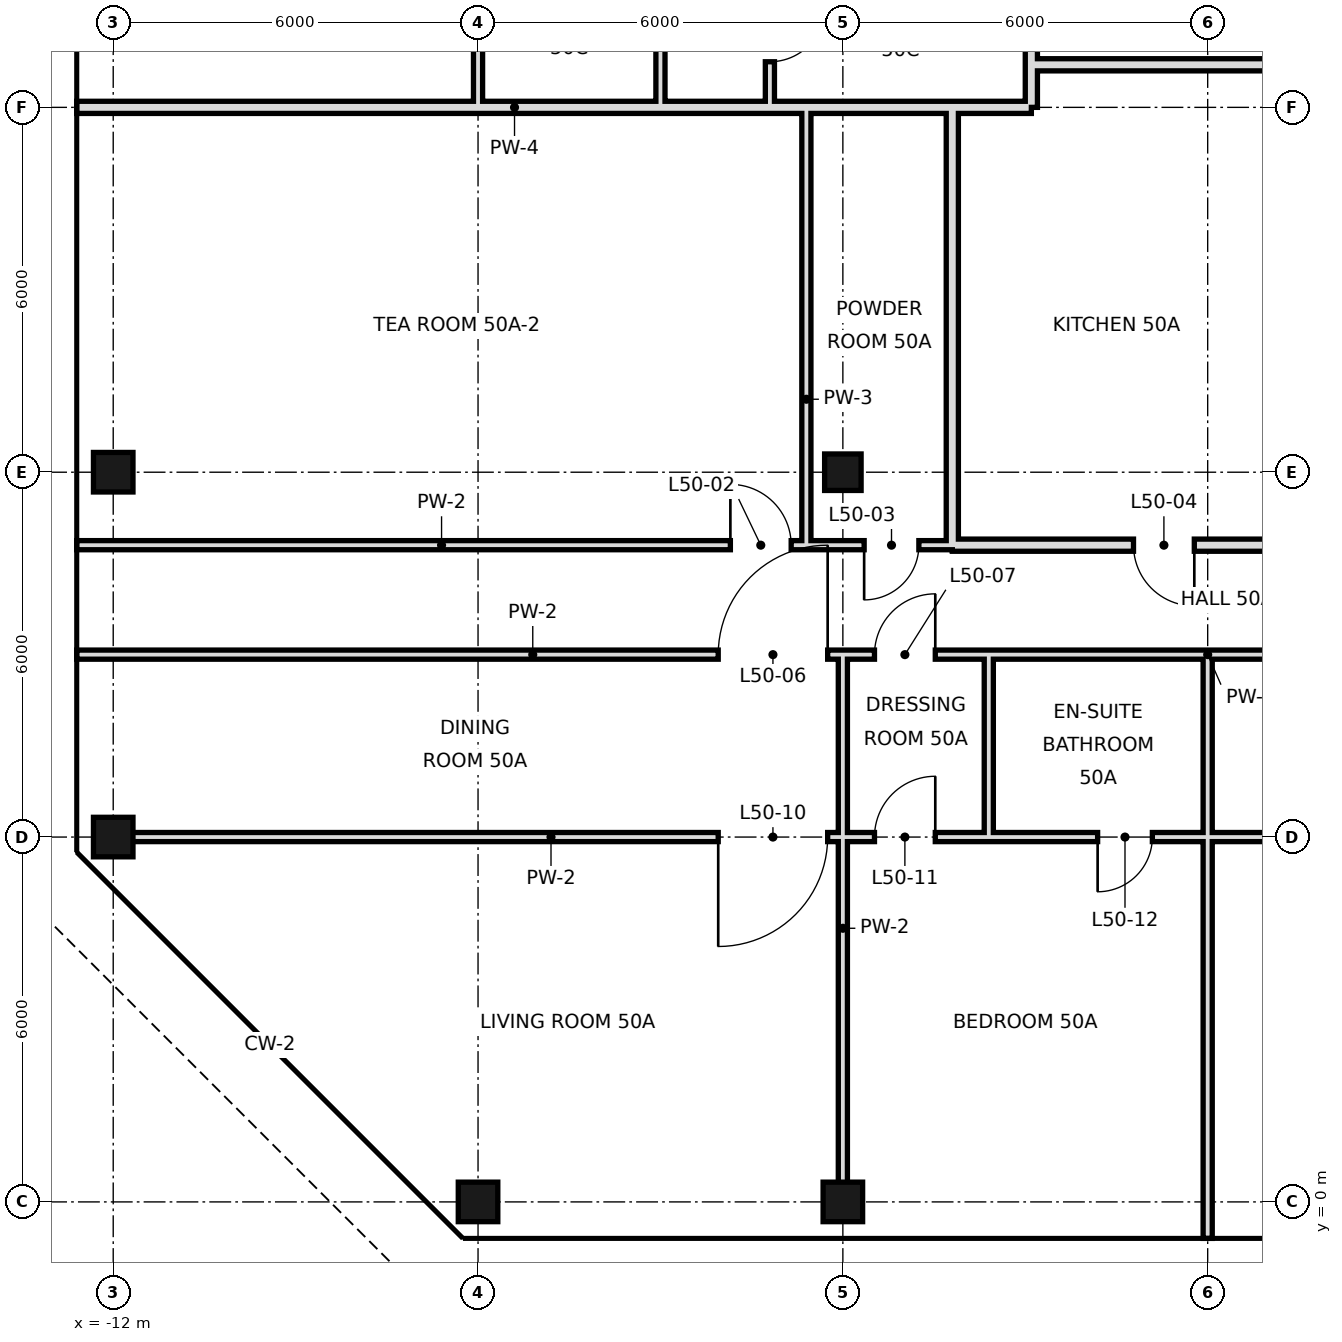
"""IFC4 building model, lengths in metres.
Left out: names, types, materials, properties, quantities, classifications, styles, units other than length and angle.
Written with IfcOpenShell. Run it as: python <this file> out.ifc"""

import sys

from ifc_helpers import new_model, si_unit, direction, frame, frame_2d, origin, origin_2d, place, context, subcontext, project, spatial, rectangle, hollow_rectangle, extrude, element, fill, save


model = new_model("IFC4")
c1 = context("Model", 3, precision=1e-05, world=origin(), true_north=direction((0.0, 1.0)))
c2 = subcontext(c1, "Body", "Model", "MODEL_VIEW")
j1 = project(units=[si_unit("LENGTHUNIT", "METRE"), si_unit("PLANEANGLEUNIT", "RADIAN")], contexts=[c1])
p1 = place(None, origin())
s1 = spatial("IfcSite", under=j1, at=p1, CompositionType="ELEMENT")
p2 = place(p1, origin())
s2 = spatial("IfcBuilding", under=s1, at=p2, CompositionType="ELEMENT")
p3 = place(p2, frame((0.0, 0.0, 215.4)))
s3 = spatial("IfcBuildingStorey", under=s2, at=p3, CompositionType="ELEMENT", Elevation=215.4)
for number, where, z_axis, x_axis in (
    (1, (-12.0, 6.0, 0.0), (0.0, 0.0, 1.0), (1.0, 0.0, 0.0)),
    (2, (-12.0, 12.0, 0.0), (0.0, 0.0, 1.0), (1.0, 0.0, 0.0)),
    (3, (-6.0, 0.0, 0.0), (0.0, 0.0, 1.0), (1.0, 0.0, 0.0)),
    (4, (0.0, 0.0, 0.0), (0.0, 0.0, 1.0), (1.0, 0.0, 0.0)),
):
    element("IfcColumn", number, at=place(p3, frame(where, z_axis=z_axis, x_axis=x_axis)), inside=s3, PredefinedType="COLUMN", context=c2, shape_type="SweptSolid", body=[
        extrude(hollow_rectangle(XDim=0.65, YDim=0.65, WallThickness=0.032, at=origin_2d()), origin(), (0.0, 0.0, 1.0), 3.6),
    ])
p4 = place(p3, frame((0.0, 12.0, 0.0), z_axis=(0.0, 0.0, 1.0), x_axis=(1.0, 0.0, 0.0)))
e5 = element("IfcColumn", 5, at=p4, inside=s3, PredefinedType="COLUMN", context=c2, shape_type="SweptSolid", body=[
    extrude(hollow_rectangle(XDim=0.6, YDim=0.6, WallThickness=0.028, at=origin_2d()), origin(), (0.0, 0.0, 1.0), 3.6),
])
p5 = place(p3, frame((-0.6, 10.8, 0.0), z_axis=(0.0, 0.0, 1.0), x_axis=(0.0, 1.0, 0.0)))
e6 = element("IfcWall", 6, at=p5, inside=s3, PredefinedType="PARTITIONING", context=c2, shape_type="SweptSolid", body=[
    extrude(rectangle(XDim=7.2, YDim=0.15, at=frame_2d((3.6, 0.0))), origin(), (0.0, 0.0, 1.0), 3.42),
])
p6 = place(p3, frame((-1.2, 18.0, 0.0), z_axis=(0.0, 0.0, 1.0), x_axis=(0.0, 1.0, 0.0)))
e7 = element("IfcWall", 7, at=p6, inside=s3, PredefinedType="PARTITIONING", context=c2, shape_type="SweptSolid", body=[
    extrude(rectangle(XDim=2.4, YDim=0.15, at=frame_2d((1.2, 0.0))), origin(), (0.0, 0.0, 1.0), 3.42),
])
p7 = place(p6, frame((0.75, 0.0, 0.0)))
e8 = element("IfcOpeningElement", 8, at=p7, cuts=e7, PredefinedType="OPENING", context=c2, shape_type="SweptSolid", body=[
    extrude(rectangle(XDim=0.9, YDim=2.4, at=frame_2d((0.45, 1.2))), frame((0.0, 0.085, 0.0), z_axis=(0.0, -1.0, 0.0), x_axis=(1.0, 0.0, 0.0)), (0.0, 0.0, 1.0), 0.17),
])
p8 = place(p3, frame((-3.0, 18.0, 0.0), z_axis=(0.0, 0.0, 1.0), x_axis=(0.0, 1.0, 0.0)))
e9 = element("IfcWall", 9, at=p8, inside=s3, PredefinedType="PARTITIONING", context=c2, shape_type="SweptSolid", body=[
    extrude(rectangle(XDim=3.0, YDim=0.15, at=frame_2d((1.5, 0.0))), origin(), (0.0, 0.0, 1.0), 3.42),
])
p9 = place(p3, frame((-6.0, 18.0, 0.0), z_axis=(0.0, 0.0, 1.0), x_axis=(0.0, 1.0, 0.0)))
e10 = element("IfcWall", 10, at=p9, inside=s3, PredefinedType="PARTITIONING", context=c2, shape_type="SweptSolid", body=[
    extrude(rectangle(XDim=3.0, YDim=0.15, at=frame_2d((1.5, 0.0))), origin(), (0.0, 0.0, 1.0), 3.42),
])
p10 = place(p9, frame((1.05, 0.0, 0.0)))
e11 = element("IfcOpeningElement", 11, at=p10, cuts=e10, PredefinedType="OPENING", context=c2, shape_type="SweptSolid", body=[
    extrude(rectangle(XDim=0.9, YDim=2.4, at=frame_2d((0.45, 1.2))), frame((0.0, 0.085, 0.0), z_axis=(0.0, -1.0, 0.0), x_axis=(1.0, 0.0, 0.0)), (0.0, 0.0, 1.0), 0.17),
])
p11 = place(p3, frame((0.0, 0.0, 0.0), z_axis=(0.0, 0.0, 1.0), x_axis=(0.0, 1.0, 0.0)))
e12 = element("IfcWall", 12, at=p11, inside=s3, PredefinedType="PARTITIONING", context=c2, shape_type="SweptSolid", body=[
    extrude(rectangle(XDim=9.0, YDim=0.15, at=frame_2d((4.5, 0.0))), origin(), (0.0, 0.0, 1.0), 2.72),
])
p12 = place(p3, frame((1.8, 10.8, 0.0), z_axis=(0.0, 0.0, 1.0), x_axis=(0.0, 1.0, 0.0)))
e13 = element("IfcWall", 13, at=p12, inside=s3, PredefinedType="SOLIDWALL", context=c2, shape_type="SweptSolid", body=[
    extrude(rectangle(XDim=7.2, YDim=0.2, at=frame_2d((3.6, 0.0))), origin(), (0.0, 0.0, 1.0), 3.42),
])
p13 = place(p3, frame((2.4, 6.0, 0.0), z_axis=(0.0, 0.0, 1.0), x_axis=(0.0, 1.0, 0.0)))
e14 = element("IfcWall", 14, at=p13, inside=s3, PredefinedType="PARTITIONING", context=c2, shape_type="SweptSolid", body=[
    extrude(rectangle(XDim=3.0, YDim=0.15, at=frame_2d((1.5, 0.0))), origin(), (0.0, 0.0, 1.0), 3.42),
])
p14 = place(p3, frame((3.1, 18.7, 0.0), z_axis=(0.0, 0.0, 1.0), x_axis=(0.0, 1.0, 0.0)))
e15 = element("IfcWall", 15, at=p14, inside=s3, PredefinedType="SOLIDWALL", context=c2, shape_type="SweptSolid", body=[
    extrude(rectangle(XDim=15.5, YDim=0.2, at=frame_2d((7.75, 0.0))), origin(), (0.0, 0.0, 1.0), 2.97),
])
p15 = place(p14, frame((4.96, 0.0, 0.0)))
e16 = element("IfcOpeningElement", 16, at=p15, cuts=e15, PredefinedType="OPENING", context=c2, shape_type="SweptSolid", body=[
    extrude(rectangle(XDim=1.2, YDim=2.4, at=frame_2d((0.6, 1.2))), frame((0.0, 0.11, 0.0), z_axis=(0.0, -1.0, 0.0), x_axis=(1.0, 0.0, 0.0)), (0.0, 0.0, 1.0), 0.22),
])
p16 = place(p3, frame((3.1, 18.0, 0.0), z_axis=(0.0, 0.0, 1.0), x_axis=(0.0, 1.0, 0.0)))
e17 = element("IfcWall", 17, at=p16, inside=s3, PredefinedType="SOLIDWALL", context=c2, shape_type="SweptSolid", body=[
    extrude(rectangle(XDim=0.7, YDim=0.2, at=frame_2d((0.35, 0.0))), origin(), (0.0, 0.0, 1.0), 2.97),
])
p17 = place(p3, frame((6.0, -0.6, 0.0), z_axis=(0.0, 0.0, 1.0), x_axis=(0.0, 1.0, 0.0)))
e18 = element("IfcWall", 18, at=p17, inside=s3, PredefinedType="PARTITIONING", context=c2, shape_type="SweptSolid", body=[
    extrude(rectangle(XDim=6.6, YDim=0.15, at=frame_2d((3.3, 0.0))), origin(), (0.0, 0.0, 1.0), 2.72),
])
p18 = place(p3, frame((6.0, 6.0, 0.0), z_axis=(0.0, 0.0, 1.0), x_axis=(0.0, 1.0, 0.0)))
e19 = element("IfcWall", 19, at=p18, inside=s3, PredefinedType="PARTITIONING", context=c2, shape_type="SweptSolid", body=[
    extrude(rectangle(XDim=3.0, YDim=0.15, at=frame_2d((1.5, 0.0))), origin(), (0.0, 0.0, 1.0), 2.72),
])
p19 = place(p3, frame((1.8, 10.8, 0.0), z_axis=(0.0, 0.0, 1.0), x_axis=(1.0, 0.0, 0.0)))
e20 = element("IfcWall", 20, at=p19, inside=s3, PredefinedType="SOLIDWALL", context=c2, shape_type="SweptSolid", body=[
    extrude(rectangle(XDim=5.4, YDim=0.2, at=frame_2d((2.7, 0.0))), origin(), (0.0, 0.0, 1.0), 2.72),
])
p20 = place(p19, frame((2.98, 0.0, 0.0)))
e21 = element("IfcOpeningElement", 21, at=p20, cuts=e20, PredefinedType="OPENING", context=c2, shape_type="SweptSolid", body=[
    extrude(rectangle(XDim=1.0, YDim=2.4, at=frame_2d((0.5, 1.2))), frame((0.0, 0.11, 0.0), z_axis=(0.0, -1.0, 0.0), x_axis=(1.0, 0.0, 0.0)), (0.0, 0.0, 1.0), 0.22),
])
p21 = place(p3, frame((-12.6, 10.8, 0.0), z_axis=(0.0, 0.0, 1.0), x_axis=(1.0, 0.0, 0.0)))
e22 = element("IfcWall", 22, at=p21, inside=s3, PredefinedType="PARTITIONING", context=c2, shape_type="SweptSolid", body=[
    extrude(rectangle(XDim=12.0, YDim=0.15, at=frame_2d((6.0, 0.0))), origin(), (0.0, 0.0, 1.0), 3.42),
])
p22 = place(p21, frame((10.75, 0.0, 0.0)))
e23 = element("IfcOpeningElement", 23, at=p22, cuts=e22, PredefinedType="OPENING", context=c2, shape_type="SweptSolid", body=[
    extrude(rectangle(XDim=1.0, YDim=2.4, at=frame_2d((0.5, 1.2))), frame((0.0, 0.085, 0.0), z_axis=(0.0, -1.0, 0.0), x_axis=(1.0, 0.0, 0.0)), (0.0, 0.0, 1.0), 0.17),
])
p23 = place(p3, frame((-0.6, 10.8, 0.0), z_axis=(0.0, 0.0, 1.0), x_axis=(1.0, 0.0, 0.0)))
e24 = element("IfcWall", 24, at=p23, inside=s3, PredefinedType="PARTITIONING", context=c2, shape_type="SweptSolid", body=[
    extrude(rectangle(XDim=2.4, YDim=0.15, at=frame_2d((1.2, 0.0))), origin(), (0.0, 0.0, 1.0), 3.42),
])
p24 = place(p23, frame((0.95, 0.0, 0.0)))
e25 = element("IfcOpeningElement", 25, at=p24, cuts=e24, PredefinedType="OPENING", context=c2, shape_type="SweptSolid", body=[
    extrude(rectangle(XDim=0.9, YDim=2.4, at=frame_2d((0.45, 1.2))), frame((0.0, 0.085, 0.0), z_axis=(0.0, -1.0, 0.0), x_axis=(1.0, 0.0, 0.0)), (0.0, 0.0, 1.0), 0.17),
])
p25 = place(p3, frame((1.8, 18.0, 0.0), z_axis=(0.0, 0.0, 1.0), x_axis=(1.0, 0.0, 0.0)))
e26 = element("IfcWall", 26, at=p25, inside=s3, PredefinedType="SOLIDWALL", context=c2, shape_type="SweptSolid", body=[
    extrude(rectangle(XDim=1.3, YDim=0.2, at=frame_2d((0.65, 0.0))), origin(), (0.0, 0.0, 1.0), 2.97),
])
p26 = place(p3, frame((-12.6, 18.0, 0.0), z_axis=(0.0, 0.0, 1.0), x_axis=(1.0, 0.0, 0.0)))
e27 = element("IfcWall", 27, at=p26, inside=s3, PredefinedType="SOLIDWALL", context=c2, shape_type="SweptSolid", body=[
    extrude(rectangle(XDim=14.4, YDim=0.2, at=frame_2d((7.2, 0.0))), origin(), (0.0, 0.0, 1.0), 2.72),
])
p27 = place(p3, frame((3.1, 18.7, 0.0), z_axis=(0.0, 0.0, 1.0), x_axis=(1.0, 0.0, 0.0)))
e28 = element("IfcWall", 28, at=p27, inside=s3, PredefinedType="SOLIDWALL", context=c2, shape_type="SweptSolid", body=[
    extrude(rectangle(XDim=4.1, YDim=0.2, at=frame_2d((2.05, 0.0))), origin(), (0.0, 0.0, 1.0), 2.72),
])
p28 = place(p3, frame((-12.0, 6.0, 0.0), z_axis=(0.0, 0.0, 1.0), x_axis=(1.0, 0.0, 0.0)))
e29 = element("IfcWall", 29, at=p28, inside=s3, PredefinedType="PARTITIONING", context=c2, shape_type="SweptSolid", body=[
    extrude(rectangle(XDim=14.4, YDim=0.15, at=frame_2d((7.2, 0.0))), origin(), (0.0, 0.0, 1.0), 2.72),
])
p29 = place(p28, frame((9.95, 0.0, 0.0)))
e30 = element("IfcOpeningElement", 30, at=p29, cuts=e29, PredefinedType="OPENING", context=c2, shape_type="SweptSolid", body=[
    extrude(rectangle(XDim=1.8, YDim=2.4, at=frame_2d((0.9, 1.2))), frame((0.0, 0.085, 0.0), z_axis=(0.0, -1.0, 0.0), x_axis=(1.0, 0.0, 0.0)), (0.0, 0.0, 1.0), 0.17),
])
p30 = place(p28, frame((12.52, 0.0, 0.0)))
e31 = element("IfcOpeningElement", 31, at=p30, cuts=e29, PredefinedType="OPENING", context=c2, shape_type="SweptSolid", body=[
    extrude(rectangle(XDim=1.0, YDim=2.4, at=frame_2d((0.5, 1.2))), frame((0.0, 0.085, 0.0), z_axis=(0.0, -1.0, 0.0), x_axis=(1.0, 0.0, 0.0)), (0.0, 0.0, 1.0), 0.17),
])
p31 = place(p3, frame((6.0, 6.0, 0.0), z_axis=(0.0, 0.0, 1.0), x_axis=(1.0, 0.0, 0.0)))
e32 = element("IfcWall", 32, at=p31, inside=s3, PredefinedType="PARTITIONING", context=c2, shape_type="SweptSolid", body=[
    extrude(rectangle(XDim=12.0, YDim=0.15, at=frame_2d((6.0, 0.0))), origin(), (0.0, 0.0, 1.0), 2.97),
])
p32 = place(p31, frame((3.4, 0.0, 0.0)))
e33 = element("IfcOpeningElement", 33, at=p32, cuts=e32, PredefinedType="OPENING", context=c2, shape_type="SweptSolid", body=[
    extrude(rectangle(XDim=1.0, YDim=2.4, at=frame_2d((0.5, 1.2))), frame((0.0, 0.085, 0.0), z_axis=(0.0, -1.0, 0.0), x_axis=(1.0, 0.0, 0.0)), (0.0, 0.0, 1.0), 0.17),
])
p33 = place(p3, frame((2.4, 6.0, 0.0), z_axis=(0.0, 0.0, 1.0), x_axis=(1.0, 0.0, 0.0)))
e34 = element("IfcWall", 34, at=p33, inside=s3, PredefinedType="PARTITIONING", context=c2, shape_type="SweptSolid", body=[
    extrude(rectangle(XDim=3.6, YDim=0.15, at=frame_2d((1.8, 0.0))), origin(), (0.0, 0.0, 1.0), 2.97),
])
p34 = place(p33, frame((1.79, 0.0, 0.0)))
e35 = element("IfcOpeningElement", 35, at=p34, cuts=e34, PredefinedType="OPENING", context=c2, shape_type="SweptSolid", body=[
    extrude(rectangle(XDim=0.9, YDim=2.4, at=frame_2d((0.45, 1.2))), frame((0.0, 0.085, 0.0), z_axis=(0.0, -1.0, 0.0), x_axis=(1.0, 0.0, 0.0)), (0.0, 0.0, 1.0), 0.17),
])
p35 = place(p3, frame((-12.6, 9.0, 0.0), z_axis=(0.0, 0.0, 1.0), x_axis=(1.0, 0.0, 0.0)))
e36 = element("IfcWall", 36, at=p35, inside=s3, PredefinedType="PARTITIONING", context=c2, shape_type="SweptSolid", body=[
    extrude(rectangle(XDim=15.0, YDim=0.15, at=frame_2d((7.5, 0.0))), origin(), (0.0, 0.0, 1.0), 3.42),
])
p36 = place(p35, frame((10.55, 0.0, 0.0)))
e37 = element("IfcOpeningElement", 37, at=p36, cuts=e36, PredefinedType="OPENING", context=c2, shape_type="SweptSolid", body=[
    extrude(rectangle(XDim=1.8, YDim=2.4, at=frame_2d((0.9, 1.2))), frame((0.0, 0.085, 0.0), z_axis=(0.0, -1.0, 0.0), x_axis=(1.0, 0.0, 0.0)), (0.0, 0.0, 1.0), 0.17),
])
p37 = place(p35, frame((13.12, 0.0, 0.0)))
e38 = element("IfcOpeningElement", 38, at=p37, cuts=e36, PredefinedType="OPENING", context=c2, shape_type="SweptSolid", body=[
    extrude(rectangle(XDim=1.0, YDim=2.4, at=frame_2d((0.5, 1.2))), frame((0.0, 0.085, 0.0), z_axis=(0.0, -1.0, 0.0), x_axis=(1.0, 0.0, 0.0)), (0.0, 0.0, 1.0), 0.17),
])
p38 = place(p3, frame((6.0, 9.0, 0.0), z_axis=(0.0, 0.0, 1.0), x_axis=(1.0, 0.0, 0.0)))
e39 = element("IfcWall", 39, at=p38, inside=s3, PredefinedType="PARTITIONING", context=c2, shape_type="SweptSolid", body=[
    extrude(rectangle(XDim=18.0, YDim=0.15, at=frame_2d((9.0, 0.0))), origin(), (0.0, 0.0, 1.0), 3.42),
])
p39 = place(p38, frame((5.5, 0.0, 0.0)))
e40 = element("IfcOpeningElement", 40, at=p39, cuts=e39, PredefinedType="OPENING", context=c2, shape_type="SweptSolid", body=[
    extrude(rectangle(XDim=1.0, YDim=2.4, at=frame_2d((0.5, 1.2))), frame((0.0, 0.085, 0.0), z_axis=(0.0, -1.0, 0.0), x_axis=(1.0, 0.0, 0.0)), (0.0, 0.0, 1.0), 0.17),
])
p40 = place(p38, frame((13.6, 0.0, 0.0)))
e41 = element("IfcOpeningElement", 41, at=p40, cuts=e39, PredefinedType="OPENING", context=c2, shape_type="SweptSolid", body=[
    extrude(rectangle(XDim=1.0, YDim=2.4, at=frame_2d((0.5, 1.2))), frame((0.0, 0.085, 0.0), z_axis=(0.0, -1.0, 0.0), x_axis=(1.0, 0.0, 0.0)), (0.0, 0.0, 1.0), 0.17),
])
p41 = place(p3, frame((2.4, 9.0, 0.0), z_axis=(0.0, 0.0, 1.0), x_axis=(1.0, 0.0, 0.0)))
e42 = element("IfcWall", 42, at=p41, inside=s3, PredefinedType="PARTITIONING", context=c2, shape_type="SweptSolid", body=[
    extrude(rectangle(XDim=3.6, YDim=0.15, at=frame_2d((1.8, 0.0))), origin(), (0.0, 0.0, 1.0), 3.42),
])
p42 = place(p22, origin())
e43 = element("IfcDoor", 43, at=p42, inside=s3, OperationType="SINGLE_SWING_LEFT", PredefinedType="DOOR", context=c2, shape_type="SweptSolid", body=[
    extrude(rectangle(XDim=1.0, YDim=2.4, at=frame_2d((0.5, 1.2))), frame((0.0, 0.025, 0.0), z_axis=(0.0, -1.0, 0.0), x_axis=(1.0, 0.0, 0.0)), (0.0, 0.0, 1.0), 0.05),
])
fill(e23, e43)
p43 = place(p24, frame((0.9, 0.0, 0.0), z_axis=(0.0, 0.0, 1.0), x_axis=(-1.0, 0.0, 0.0)))
e44 = element("IfcDoor", 44, at=p43, inside=s3, OperationType="SINGLE_SWING_RIGHT", PredefinedType="DOOR", context=c2, shape_type="SweptSolid", body=[
    extrude(rectangle(XDim=0.9, YDim=2.4, at=frame_2d((0.45, 1.2))), frame((0.0, 0.025, 0.0), z_axis=(0.0, -1.0, 0.0), x_axis=(1.0, 0.0, 0.0)), (0.0, 0.0, 1.0), 0.05),
])
fill(e25, e44)
p44 = place(p20, origin())
e45 = element("IfcDoor", 45, at=p44, inside=s3, OperationType="SINGLE_SWING_RIGHT", PredefinedType="DOOR", context=c2, shape_type="SweptSolid", body=[
    extrude(rectangle(XDim=1.0, YDim=2.4, at=frame_2d((0.5, 1.2))), frame((0.0, 0.025, 0.0), z_axis=(0.0, -1.0, 0.0), x_axis=(1.0, 0.0, 0.0)), (0.0, 0.0, 1.0), 0.05),
])
fill(e21, e45)
p45 = place(p36, frame((1.8, 0.0, 0.0), z_axis=(0.0, 0.0, 1.0), x_axis=(-1.0, 0.0, 0.0)))
e46 = element("IfcDoor", 46, at=p45, inside=s3, OperationType="SINGLE_SWING_LEFT", PredefinedType="DOOR", context=c2, shape_type="SweptSolid", body=[
    extrude(rectangle(XDim=1.8, YDim=2.4, at=frame_2d((0.9, 1.2))), frame((0.0, 0.025, 0.0), z_axis=(0.0, -1.0, 0.0), x_axis=(1.0, 0.0, 0.0)), (0.0, 0.0, 1.0), 0.05),
])
fill(e37, e46)
p46 = place(p37, frame((1.0, 0.0, 0.0), z_axis=(0.0, 0.0, 1.0), x_axis=(-1.0, 0.0, 0.0)))
e47 = element("IfcDoor", 47, at=p46, inside=s3, OperationType="SINGLE_SWING_LEFT", PredefinedType="DOOR", context=c2, shape_type="SweptSolid", body=[
    extrude(rectangle(XDim=1.0, YDim=2.4, at=frame_2d((0.5, 1.2))), frame((0.0, 0.025, 0.0), z_axis=(0.0, -1.0, 0.0), x_axis=(1.0, 0.0, 0.0)), (0.0, 0.0, 1.0), 0.05),
])
fill(e38, e47)
p47 = place(p29, frame((1.8, 0.0, 0.0), z_axis=(0.0, 0.0, 1.0), x_axis=(-1.0, 0.0, 0.0)))
e48 = element("IfcDoor", 48, at=p47, inside=s3, OperationType="SINGLE_SWING_RIGHT", PredefinedType="DOOR", context=c2, shape_type="SweptSolid", body=[
    extrude(rectangle(XDim=1.8, YDim=2.4, at=frame_2d((0.9, 1.2))), frame((0.0, 0.025, 0.0), z_axis=(0.0, -1.0, 0.0), x_axis=(1.0, 0.0, 0.0)), (0.0, 0.0, 1.0), 0.05),
])
fill(e30, e48)
p48 = place(p30, frame((1.0, 0.0, 0.0), z_axis=(0.0, 0.0, 1.0), x_axis=(-1.0, 0.0, 0.0)))
e49 = element("IfcDoor", 49, at=p48, inside=s3, OperationType="SINGLE_SWING_LEFT", PredefinedType="DOOR", context=c2, shape_type="SweptSolid", body=[
    extrude(rectangle(XDim=1.0, YDim=2.4, at=frame_2d((0.5, 1.2))), frame((0.0, 0.025, 0.0), z_axis=(0.0, -1.0, 0.0), x_axis=(1.0, 0.0, 0.0)), (0.0, 0.0, 1.0), 0.05),
])
fill(e31, e49)
p49 = place(p34, frame((0.9, 0.0, 0.0), z_axis=(0.0, 0.0, 1.0), x_axis=(-1.0, 0.0, 0.0)))
e50 = element("IfcDoor", 50, at=p49, inside=s3, OperationType="SINGLE_SWING_RIGHT", PredefinedType="DOOR", context=c2, shape_type="SweptSolid", body=[
    extrude(rectangle(XDim=0.9, YDim=2.4, at=frame_2d((0.45, 1.2))), frame((0.0, 0.025, 0.0), z_axis=(0.0, -1.0, 0.0), x_axis=(1.0, 0.0, 0.0)), (0.0, 0.0, 1.0), 0.05),
])
fill(e35, e50)
p50 = place(p7, origin())
e51 = element("IfcDoor", 51, at=p50, inside=s3, OperationType="SINGLE_SWING_RIGHT", PredefinedType="DOOR", context=c2, shape_type="SweptSolid", body=[
    extrude(rectangle(XDim=0.9, YDim=2.4, at=frame_2d((0.45, 1.2))), frame((0.0, 0.025, 0.0), z_axis=(0.0, -1.0, 0.0), x_axis=(1.0, 0.0, 0.0)), (0.0, 0.0, 1.0), 0.05),
])
fill(e8, e51)
save(model, sys.argv[1])
